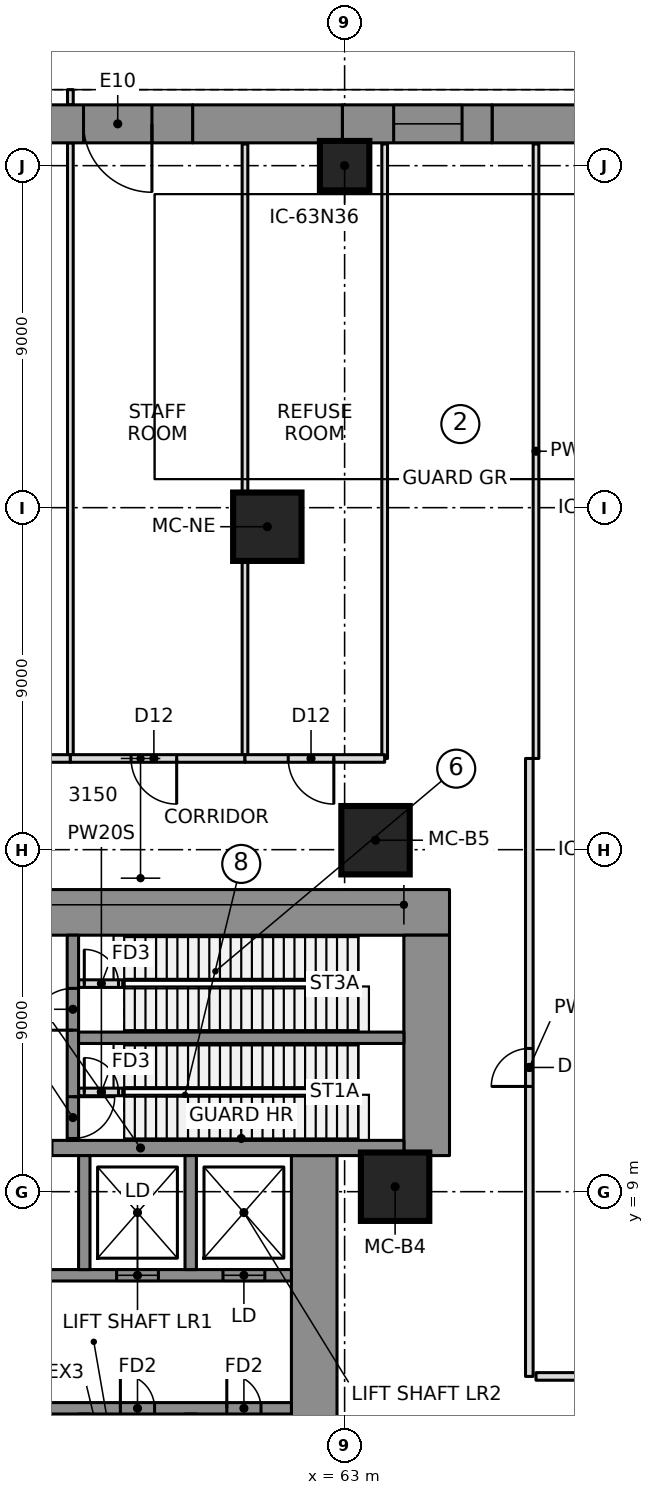
"""IFC4 building model, lengths in metres.
Left out: names, types, materials, properties, quantities, classifications, styles, units other than length and angle.
Written with IfcOpenShell. Run it as: python <this file> out.ifc"""

import sys

from ifc_helpers import new_model, si_unit, direction, frame, frame_2d, origin, origin_2d, place, context, subcontext, project, spatial, polyline, rectangle, outline, extrude, element, fill, save


model = new_model("IFC4")
c1 = context("Model", 3, precision=1e-05, world=origin(), true_north=direction((0.0, 1.0)))
c2 = subcontext(c1, "Body", "Model", "MODEL_VIEW")
j1 = project(units=[si_unit("LENGTHUNIT", "METRE"), si_unit("PLANEANGLEUNIT", "RADIAN")], contexts=[c1])
p1 = place(None, origin())
s1 = spatial("IfcSite", under=j1, at=p1, CompositionType="ELEMENT")
p2 = place(p1, origin())
s2 = spatial("IfcBuilding", under=s1, at=p2, CompositionType="ELEMENT")
p3 = place(p2, origin())
s3 = spatial("IfcBuildingStorey", under=s2, at=p3, CompositionType="ELEMENT", Elevation=0.0)
p4 = place(p3, frame((50.7, 16.35, 0.0), z_axis=(0.0, 0.0, 1.0), x_axis=(1.0, 0.0, 0.0)))
e1 = element("IfcWall", 1, at=p4, inside=s3, PredefinedType="SHEAR", context=c2, shape_type="SweptSolid", body=[
    extrude(rectangle(XDim=15.06, YDim=1.2, at=frame_2d((7.53, 0.0))), origin(), (0.0, 0.0, 1.0), 8.0),
])
p5 = place(p3, frame((65.16, 9.95, 0.0), z_axis=(0.0, 0.0, 1.0), x_axis=(0.0, 1.0, 0.0)))
e2 = element("IfcWall", 2, at=p5, inside=s3, PredefinedType="SHEAR", context=c2, shape_type="SweptSolid", body=[
    extrude(rectangle(XDim=5.8, YDim=1.2, at=frame_2d((2.9, 0.0))), origin(), (0.0, 0.0, 1.0), 8.0),
])
p6 = place(p3, frame((62.2, -9.95, 0.0), z_axis=(0.0, 0.0, 1.0), x_axis=(0.0, 1.0, 0.0)))
e3 = element("IfcWall", 3, at=p6, inside=s3, PredefinedType="SHEAR", context=c2, shape_type="SweptSolid", body=[
    extrude(rectangle(XDim=19.9, YDim=1.2, at=frame_2d((9.95, 0.0))), origin(), (0.0, 0.0, 1.0), 8.0),
])
p7 = place(p3, frame((50.7, 10.15, 0.0), z_axis=(0.0, 0.0, 1.0), x_axis=(1.0, 0.0, 0.0)))
e4 = element("IfcWall", 4, at=p7, inside=s3, PredefinedType="SHEAR", context=c2, shape_type="SweptSolid", body=[
    extrude(rectangle(XDim=13.86, YDim=0.4, at=frame_2d((6.93, 0.0))), origin(), (0.0, 0.0, 1.0), 8.0),
])
p8 = place(p7, frame((0.7, 0.0, 0.0)))
e5 = element("IfcOpeningElement", 5, at=p8, cuts=e4, PredefinedType="OPENING", context=c2, shape_type="SweptSolid", body=[
    extrude(rectangle(XDim=1.1, YDim=2.1, at=frame_2d((0.55, 1.05))), frame((0.0, 0.21, 0.0), z_axis=(0.0, -1.0, 0.0), x_axis=(1.0, 0.0, 0.0)), (0.0, 0.0, 1.0), 0.42),
])
p9 = place(p7, frame((3.5, 0.0, 0.0)))
e6 = element("IfcOpeningElement", 6, at=p9, cuts=e4, PredefinedType="OPENING", context=c2, shape_type="SweptSolid", body=[
    extrude(rectangle(XDim=1.1, YDim=2.1, at=frame_2d((0.55, 1.05))), frame((0.0, 0.21, 0.0), z_axis=(0.0, -1.0, 0.0), x_axis=(1.0, 0.0, 0.0)), (0.0, 0.0, 1.0), 0.42),
])
p10 = place(p3, frame((50.7, 3.3, 0.0), z_axis=(0.0, 0.0, 1.0), x_axis=(1.0, 0.0, 0.0)))
e7 = element("IfcWall", 7, at=p10, inside=s3, PredefinedType="SHEAR", context=c2, shape_type="SweptSolid", body=[
    extrude(rectangle(XDim=10.9, YDim=0.3, at=frame_2d((5.45, 0.0))), origin(), (0.0, 0.0, 1.0), 8.0),
])
p11 = place(p10, frame((0.8, 0.0, 0.0)))
e8 = element("IfcOpeningElement", 8, at=p11, cuts=e7, PredefinedType="OPENING", context=c2, shape_type="SweptSolid", body=[
    extrude(rectangle(XDim=0.9, YDim=2.1, at=frame_2d((0.45, 1.05))), frame((0.0, 0.16, 0.0), z_axis=(0.0, -1.0, 0.0), x_axis=(1.0, 0.0, 0.0)), (0.0, 0.0, 1.0), 0.32),
])
p12 = place(p10, frame((3.6, 0.0, 0.0)))
e9 = element("IfcOpeningElement", 9, at=p12, cuts=e7, PredefinedType="OPENING", context=c2, shape_type="SweptSolid", body=[
    extrude(rectangle(XDim=0.9, YDim=2.1, at=frame_2d((0.45, 1.05))), frame((0.0, 0.16, 0.0), z_axis=(0.0, -1.0, 0.0), x_axis=(1.0, 0.0, 0.0)), (0.0, 0.0, 1.0), 0.32),
])
p13 = place(p10, frame((6.4, 0.0, 0.0)))
e10 = element("IfcOpeningElement", 10, at=p13, cuts=e7, PredefinedType="OPENING", context=c2, shape_type="SweptSolid", body=[
    extrude(rectangle(XDim=0.9, YDim=2.1, at=frame_2d((0.45, 1.05))), frame((0.0, 0.16, 0.0), z_axis=(0.0, -1.0, 0.0), x_axis=(1.0, 0.0, 0.0)), (0.0, 0.0, 1.0), 0.32),
])
p14 = place(p10, frame((9.2, 0.0, 0.0)))
e11 = element("IfcOpeningElement", 11, at=p14, cuts=e7, PredefinedType="OPENING", context=c2, shape_type="SweptSolid", body=[
    extrude(rectangle(XDim=0.9, YDim=2.1, at=frame_2d((0.45, 1.05))), frame((0.0, 0.16, 0.0), z_axis=(0.0, -1.0, 0.0), x_axis=(1.0, 0.0, 0.0)), (0.0, 0.0, 1.0), 0.32),
])
p15 = place(p3, frame((50.7, 6.8, 0.0), z_axis=(0.0, 0.0, 1.0), x_axis=(1.0, 0.0, 0.0)))
e12 = element("IfcWall", 12, at=p15, inside=s3, PredefinedType="SHEAR", context=c2, shape_type="SweptSolid", body=[
    extrude(rectangle(XDim=10.9, YDim=0.3, at=frame_2d((5.45, 0.0))), origin(), (0.0, 0.0, 1.0), 8.0),
])
p16 = place(p15, frame((6.3, 0.0, 0.0)))
e13 = element("IfcOpeningElement", 13, at=p16, cuts=e12, PredefinedType="OPENING", context=c2, shape_type="SweptSolid", body=[
    extrude(rectangle(XDim=1.1, YDim=2.1, at=frame_2d((0.55, 1.05))), frame((0.0, 0.16, 0.0), z_axis=(0.0, -1.0, 0.0), x_axis=(1.0, 0.0, 0.0)), (0.0, 0.0, 1.0), 0.32),
])
p17 = place(p15, frame((9.1, 0.0, 0.0)))
e14 = element("IfcOpeningElement", 14, at=p17, cuts=e12, PredefinedType="OPENING", context=c2, shape_type="SweptSolid", body=[
    extrude(rectangle(XDim=1.1, YDim=2.1, at=frame_2d((0.55, 1.05))), frame((0.0, 0.16, 0.0), z_axis=(0.0, -1.0, 0.0), x_axis=(1.0, 0.0, 0.0)), (0.0, 0.0, 1.0), 0.32),
])
for number, where, z_axis, x_axis in (
    (15, (56.15, 0.15, 0.0), (0.0, 0.0, 1.0), (0.0, 1.0, 0.0)),
    (16, (56.15, 6.95, 0.0), (0.0, 0.0, 1.0), (0.0, 1.0, 0.0)),
    (17, (58.95, 0.15, 0.0), (0.0, 0.0, 1.0), (0.0, 1.0, 0.0)),
    (18, (58.95, 6.95, 0.0), (0.0, 0.0, 1.0), (0.0, 1.0, 0.0)),
):
    element("IfcWall", number, at=place(p3, frame(where, z_axis=z_axis, x_axis=x_axis)), inside=s3, PredefinedType="SHEAR", context=c2, shape_type="SweptSolid", body=[
        extrude(rectangle(XDim=3.0, YDim=0.3, at=frame_2d((1.5, 0.0))), origin(), (0.0, 0.0, 1.0), 8.0),
    ])
p18 = place(p3, frame((55.85, 10.35, 0.0), z_axis=(0.0, 0.0, 1.0), x_axis=(0.0, 1.0, 0.0)))
e19 = element("IfcWall", 19, at=p18, inside=s3, PredefinedType="SHEAR", context=c2, shape_type="SweptSolid", body=[
    extrude(rectangle(XDim=5.4, YDim=0.3, at=frame_2d((2.7, 0.0))), origin(), (0.0, 0.0, 1.0), 8.0),
])
p19 = place(p18, frame((0.05, 0.0, 0.0)))
e20 = element("IfcOpeningElement", 20, at=p19, cuts=e19, PredefinedType="OPENING", context=c2, shape_type="SweptSolid", body=[
    extrude(rectangle(XDim=1.1, YDim=2.1, at=frame_2d((0.55, 1.05))), frame((0.0, 0.16, 0.0), z_axis=(0.0, -1.0, 0.0), x_axis=(1.0, 0.0, 0.0)), (0.0, 0.0, 1.0), 0.32),
])
p20 = place(p18, frame((2.9, 0.0, 0.0)))
e21 = element("IfcOpeningElement", 21, at=p20, cuts=e19, PredefinedType="OPENING", context=c2, shape_type="SweptSolid", body=[
    extrude(rectangle(XDim=1.1, YDim=2.1, at=frame_2d((0.55, 1.05))), frame((0.0, 0.16, 0.0), z_axis=(0.0, -1.0, 0.0), x_axis=(1.0, 0.0, 0.0)), (0.0, 0.0, 1.0), 0.32),
])
p21 = place(p3, frame((56.0, 13.05, 0.0), z_axis=(0.0, 0.0, 1.0), x_axis=(1.0, 0.0, 0.0)))
e22 = element("IfcWall", 22, at=p21, inside=s3, PredefinedType="SHEAR", context=c2, shape_type="SweptSolid", body=[
    extrude(rectangle(XDim=8.56, YDim=0.3, at=frame_2d((4.28, 0.0))), origin(), (0.0, 0.0, 1.0), 8.0),
])
for number, where, z_axis, x_axis in (
    (23, (64.328, 9.131, 0.0), (0.0, 0.0, 1.0), (1.0, 0.0, 0.0)),
    (24, (63.813, 18.249, 0.0), (0.0, 0.0, 1.0), (1.0, 0.0, 0.0)),
    (25, (60.966, 26.499, 0.0), (0.0, 0.0, 1.0), (1.0, 0.0, 0.0)),
):
    element("IfcColumn", number, at=place(p3, frame(where, z_axis=z_axis, x_axis=x_axis)), inside=s3, PredefinedType="COLUMN", context=c2, shape_type="SweptSolid", body=[
        extrude(rectangle(XDim=1.8, YDim=1.8, at=origin_2d()), origin(), (0.0, 0.0, 1.0), 8.0),
    ])
p22 = place(p3, frame((63.0, 36.0, 0.0), z_axis=(0.0, 0.0, 1.0), x_axis=(1.0, 0.0, 0.0)))
e26 = element("IfcColumn", 26, at=p22, inside=s3, PredefinedType="COLUMN", context=c2, shape_type="SweptSolid", body=[
    extrude(rectangle(XDim=1.3, YDim=1.3, at=origin_2d()), origin(), (0.0, 0.0, 1.0), 8.0),
])
p23 = place(p3, frame((70.821, 37.1, 0.0), z_axis=(0.0, 0.0, 1.0), x_axis=(-1.0, 0.0, 0.0)))
e27 = element("IfcWall", 27, at=p23, inside=s3, PredefinedType="NOTDEFINED", context=c2, shape_type="SweptSolid", body=[
    extrude(outline(polyline([(-0.1, -0.5), (3.94, -0.5), (3.94, 0.5), (0.1, 0.5), (-0.1, -0.5)])), origin(), (0.0, 0.0, 1.0), 7.7),
])
p24 = place(p3, frame((66.881, 37.1, 0.0), z_axis=(0.0, 0.0, 1.0), x_axis=(-1.0, 0.0, 0.0)))
e28 = element("IfcWall", 28, at=p24, inside=s3, PredefinedType="NOTDEFINED", context=c2, shape_type="SweptSolid", body=[
    extrude(outline(polyline([(0.0, -0.5), (3.94, -0.5), (3.94, 0.5), (0.0, 0.5), (0.0, -0.5)])), origin(), (0.0, 0.0, 1.0), 7.7),
])
p25 = place(p24, frame((0.79, 0.0, 0.9)))
e29 = element("IfcOpeningElement", 29, at=p25, cuts=e28, PredefinedType="OPENING", context=c2, shape_type="SweptSolid", body=[
    extrude(rectangle(XDim=1.8, YDim=2.4, at=frame_2d((0.9, 1.2))), frame((0.0, 0.51, 0.0), z_axis=(0.0, -1.0, 0.0), x_axis=(1.0, 0.0, 0.0)), (0.0, 0.0, 1.0), 1.02),
])
p26 = place(p3, frame((62.94, 37.1, 0.0), z_axis=(0.0, 0.0, 1.0), x_axis=(-1.0, 0.0, 0.0)))
e30 = element("IfcWall", 30, at=p26, inside=s3, PredefinedType="NOTDEFINED", context=c2, shape_type="SweptSolid", body=[
    extrude(outline(polyline([(0.0, -0.5), (3.94, -0.5), (3.94, 0.5), (0.0, 0.5), (0.0, -0.5)])), origin(), (0.0, 0.0, 1.0), 7.7),
])
p27 = place(p3, frame((59.0, 37.1, 0.0), z_axis=(0.0, 0.0, 1.0), x_axis=(-1.0, 0.0, 0.0)))
e31 = element("IfcWall", 31, at=p27, inside=s3, PredefinedType="NOTDEFINED", context=c2, shape_type="SweptSolid", body=[
    extrude(outline(polyline([(0.0, -0.5), (3.94, -0.5), (3.94, 0.5), (0.0, 0.5), (0.0, -0.5)])), origin(), (0.0, 0.0, 1.0), 7.7),
])
p28 = place(p27, frame((1.07, 0.0, 0.0)))
e32 = element("IfcOpeningElement", 32, at=p28, cuts=e31, PredefinedType="OPENING", context=c2, shape_type="SweptSolid", body=[
    extrude(rectangle(XDim=1.8, YDim=2.4, at=frame_2d((0.9, 1.2))), frame((0.0, 0.51, 0.0), z_axis=(0.0, -1.0, 0.0), x_axis=(1.0, 0.0, 0.0)), (0.0, 0.0, 1.0), 1.02),
])
p29 = place(p3, frame((55.784, 20.4, 0.0), z_axis=(0.0, 0.0, 1.0), x_axis=(0.0, 1.0, 0.0)))
e33 = element("IfcWall", 33, at=p29, inside=s3, PredefinedType="PARTITIONING", context=c2, shape_type="SweptSolid", body=[
    extrude(rectangle(XDim=16.2, YDim=0.15, at=frame_2d((8.1, 0.0))), origin(), (0.0, 0.0, 1.0), 7.65),
])
p30 = place(p3, frame((55.784, 37.6, 0.0), z_axis=(0.0, 0.0, 1.0), x_axis=(0.0, 1.0, 0.0)))
e34 = element("IfcWall", 34, at=p30, inside=s3, PredefinedType="PARTITIONING", context=c2, shape_type="SweptSolid", body=[
    extrude(rectangle(XDim=0.4, YDim=0.15, at=frame_2d((0.2, 0.0))), origin(), (0.0, 0.0, 1.0), 7.65),
])
for number, where, z_axis, x_axis in (
    (35, (60.378, 20.4, 0.0), (0.0, 0.0, 1.0), (0.0, 1.0, 0.0)),
    (36, (64.054, 20.4, 0.0), (0.0, 0.0, 1.0), (0.0, 1.0, 0.0)),
):
    element("IfcWall", number, at=place(p3, frame(where, z_axis=z_axis, x_axis=x_axis)), inside=s3, PredefinedType="PARTITIONING", context=c2, shape_type="SweptSolid", body=[
        extrude(rectangle(XDim=16.17, YDim=0.15, at=frame_2d((8.085, 0.0))), origin(), (0.0, 0.0, 1.0), 7.65),
    ])
p31 = place(p3, frame((68.036, 4.139, 0.0), z_axis=(0.0, 0.0, 1.0), x_axis=(1.0, 0.0, 0.0)))
e37 = element("IfcWall", 37, at=p31, inside=s3, PredefinedType="PARTITIONING", context=c2, shape_type="SweptSolid", body=[
    extrude(rectangle(XDim=4.595, YDim=0.2, at=frame_2d((2.297, 0.0))), origin(), (0.0, 0.0, 1.0), 7.65),
])
p32 = place(p31, frame((1.797, 0.0, 0.0)))
e38 = element("IfcOpeningElement", 38, at=p32, cuts=e37, PredefinedType="OPENING", context=c2, shape_type="SweptSolid", body=[
    extrude(rectangle(XDim=1.2, YDim=2.1, at=frame_2d((0.6, 1.05))), frame((0.0, 0.11, 0.0), z_axis=(0.0, -1.0, 0.0), x_axis=(1.0, 0.0, 0.0)), (0.0, 0.0, 1.0), 0.22),
])
p33 = place(p3, frame((55.784, 20.4, 0.0), z_axis=(0.0, 0.0, 1.0), x_axis=(-1.0, 0.0, 0.0)))
e39 = element("IfcWall", 39, at=p33, inside=s3, PredefinedType="PARTITIONING", context=c2, shape_type="SweptSolid", body=[
    extrude(rectangle(XDim=4.594, YDim=0.2, at=frame_2d((2.297, 0.0))), origin(), (0.0, 0.0, 1.0), 7.65),
])
p34 = place(p33, frame((1.797, 0.0, 0.0)))
e40 = element("IfcOpeningElement", 40, at=p34, cuts=e39, PredefinedType="OPENING", context=c2, shape_type="SweptSolid", body=[
    extrude(rectangle(XDim=1.2, YDim=2.1, at=frame_2d((0.6, 1.05))), frame((0.0, 0.11, 0.0), z_axis=(0.0, -1.0, 0.0), x_axis=(1.0, 0.0, 0.0)), (0.0, 0.0, 1.0), 0.22),
])
p35 = place(p3, frame((60.378, 20.4, 0.0), z_axis=(0.0, 0.0, 1.0), x_axis=(-1.0, 0.0, 0.0)))
e41 = element("IfcWall", 41, at=p35, inside=s3, PredefinedType="PARTITIONING", context=c2, shape_type="SweptSolid", body=[
    extrude(rectangle(XDim=4.595, YDim=0.2, at=frame_2d((2.297, 0.0))), origin(), (0.0, 0.0, 1.0), 7.65),
])
p36 = place(p35, frame((1.797, 0.0, 0.0)))
e42 = element("IfcOpeningElement", 42, at=p36, cuts=e41, PredefinedType="OPENING", context=c2, shape_type="SweptSolid", body=[
    extrude(rectangle(XDim=1.2, YDim=2.1, at=frame_2d((0.6, 1.05))), frame((0.0, 0.11, 0.0), z_axis=(0.0, -1.0, 0.0), x_axis=(1.0, 0.0, 0.0)), (0.0, 0.0, 1.0), 0.22),
])
p37 = place(p3, frame((64.054, 20.4, 0.0), z_axis=(0.0, 0.0, 1.0), x_axis=(-1.0, 0.0, 0.0)))
e43 = element("IfcWall", 43, at=p37, inside=s3, PredefinedType="PARTITIONING", context=c2, shape_type="SweptSolid", body=[
    extrude(rectangle(XDim=3.676, YDim=0.2, at=frame_2d((1.838, 0.0))), origin(), (0.0, 0.0, 1.0), 7.65),
])
p38 = place(p37, frame((1.338, 0.0, 0.0)))
e44 = element("IfcOpeningElement", 44, at=p38, cuts=e43, PredefinedType="OPENING", context=c2, shape_type="SweptSolid", body=[
    extrude(rectangle(XDim=1.2, YDim=2.1, at=frame_2d((0.6, 1.05))), frame((0.0, 0.11, 0.0), z_axis=(0.0, -1.0, 0.0), x_axis=(1.0, 0.0, 0.0)), (0.0, 0.0, 1.0), 0.22),
])
p39 = place(p3, frame((67.86, 4.139, 0.0), z_axis=(0.0, 0.0, 1.0), x_axis=(0.0, 1.0, 0.0)))
e45 = element("IfcWall", 45, at=p39, inside=s3, PredefinedType="PARTITIONING", context=c2, shape_type="SweptSolid", body=[
    extrude(rectangle(XDim=16.261, YDim=0.2, at=frame_2d((8.131, 0.0))), origin(), (0.0, 0.0, 1.0), 7.65),
])
p40 = place(p39, frame((7.631, 0.0, 0.0)))
e46 = element("IfcOpeningElement", 46, at=p40, cuts=e45, PredefinedType="OPENING", context=c2, shape_type="SweptSolid", body=[
    extrude(rectangle(XDim=1.0, YDim=2.1, at=frame_2d((0.5, 1.05))), frame((0.0, 0.11, 0.0), z_axis=(0.0, -1.0, 0.0), x_axis=(1.0, 0.0, 0.0)), (0.0, 0.0, 1.0), 0.22),
])
p41 = place(p3, frame((68.036, 20.4, 0.0), z_axis=(0.0, 0.0, 1.0), x_axis=(0.0, 1.0, 0.0)))
e47 = element("IfcWall", 47, at=p41, inside=s3, PredefinedType="PARTITIONING", context=c2, shape_type="SweptSolid", body=[
    extrude(rectangle(XDim=16.17, YDim=0.15, at=frame_2d((8.085, 0.0))), origin(), (0.0, 0.0, 1.0), 7.65),
])
p42 = place(p3, frame((56.0, 11.625, 0.0), z_axis=(0.0, 0.0, 1.0), x_axis=(1.0, 0.0, 0.0)))
e48 = element("IfcWall", 48, at=p42, inside=s3, PredefinedType="PARTITIONING", context=c2, shape_type="SweptSolid", body=[
    extrude(rectangle(XDim=1.2, YDim=0.2, at=frame_2d((0.6, 0.0))), origin(), (0.0, 0.0, 1.0), 7.65),
])
p43 = place(p42, frame((0.15, 0.0, 0.0)))
e49 = element("IfcOpeningElement", 49, at=p43, cuts=e48, PredefinedType="OPENING", context=c2, shape_type="SweptSolid", body=[
    extrude(rectangle(XDim=0.9, YDim=2.1, at=frame_2d((0.45, 1.05))), frame((0.0, 0.11, 0.0), z_axis=(0.0, -1.0, 0.0), x_axis=(1.0, 0.0, 0.0)), (0.0, 0.0, 1.0), 0.22),
])
p44 = place(p3, frame((56.0, 14.475, 0.0), z_axis=(0.0, 0.0, 1.0), x_axis=(1.0, 0.0, 0.0)))
e50 = element("IfcWall", 50, at=p44, inside=s3, PredefinedType="PARTITIONING", context=c2, shape_type="SweptSolid", body=[
    extrude(rectangle(XDim=1.2, YDim=0.2, at=frame_2d((0.6, 0.0))), origin(), (0.0, 0.0, 1.0), 7.65),
])
p45 = place(p44, frame((0.15, 0.0, 0.0)))
e51 = element("IfcOpeningElement", 51, at=p45, cuts=e50, PredefinedType="OPENING", context=c2, shape_type="SweptSolid", body=[
    extrude(rectangle(XDim=0.9, YDim=2.1, at=frame_2d((0.45, 1.05))), frame((0.0, 0.11, 0.0), z_axis=(0.0, -1.0, 0.0), x_axis=(1.0, 0.0, 0.0)), (0.0, 0.0, 1.0), 0.22),
])
p46 = place(p25, origin())
e52 = element("IfcWindow", 52, at=p46, inside=s3, PartitioningType="SINGLE_PANEL", PredefinedType="WINDOW", context=c2, shape_type="SweptSolid", body=[
    extrude(rectangle(XDim=1.8, YDim=2.4, at=frame_2d((0.9, 1.2))), frame((0.0, 0.5, 0.0), z_axis=(0.0, -1.0, 0.0), x_axis=(1.0, 0.0, 0.0)), (0.0, 0.0, 1.0), 0.06),
])
fill(e29, e52)
p47 = place(p28, origin())
e53 = element("IfcDoor", 53, at=p47, inside=s3, OperationType="DOUBLE_DOOR_SINGLE_SWING", PredefinedType="DOOR", context=c2, shape_type="SweptSolid", body=[
    extrude(rectangle(XDim=1.8, YDim=2.4, at=frame_2d((0.9, 1.2))), frame((0.0, 0.495, 0.0), z_axis=(0.0, -1.0, 0.0), x_axis=(1.0, 0.0, 0.0)), (0.0, 0.0, 1.0), 0.05),
])
fill(e32, e53)
p48 = place(p36, origin())
e54 = element("IfcDoor", 54, at=p48, inside=s3, OperationType="SINGLE_SWING_RIGHT", PredefinedType="DOOR", context=c2, shape_type="SweptSolid", body=[
    extrude(rectangle(XDim=1.2, YDim=2.1, at=frame_2d((0.6, 1.05))), frame((0.0, 0.025, 0.0), z_axis=(0.0, -1.0, 0.0), x_axis=(1.0, 0.0, 0.0)), (0.0, 0.0, 1.0), 0.05),
])
fill(e42, e54)
p49 = place(p38, origin())
e55 = element("IfcDoor", 55, at=p49, inside=s3, OperationType="SINGLE_SWING_RIGHT", PredefinedType="DOOR", context=c2, shape_type="SweptSolid", body=[
    extrude(rectangle(XDim=1.2, YDim=2.1, at=frame_2d((0.6, 1.05))), frame((0.0, 0.025, 0.0), z_axis=(0.0, -1.0, 0.0), x_axis=(1.0, 0.0, 0.0)), (0.0, 0.0, 1.0), 0.05),
])
fill(e44, e55)
p50 = place(p40, origin())
e56 = element("IfcDoor", 56, at=p50, inside=s3, OperationType="SINGLE_SWING_LEFT", PredefinedType="DOOR", context=c2, shape_type="SweptSolid", body=[
    extrude(rectangle(XDim=1.0, YDim=2.1, at=frame_2d((0.5, 1.05))), frame((0.0, 0.025, 0.0), z_axis=(0.0, -1.0, 0.0), x_axis=(1.0, 0.0, 0.0)), (0.0, 0.0, 1.0), 0.05),
])
fill(e46, e56)
p51 = place(p43, origin())
e57 = element("IfcDoor", 57, at=p51, inside=s3, OperationType="SINGLE_SWING_LEFT", PredefinedType="DOOR", context=c2, shape_type="SweptSolid", body=[
    extrude(rectangle(XDim=0.9, YDim=2.1, at=frame_2d((0.45, 1.05))), frame((0.0, 0.025, 0.0), z_axis=(0.0, -1.0, 0.0), x_axis=(1.0, 0.0, 0.0)), (0.0, 0.0, 1.0), 0.05),
])
fill(e49, e57)
p52 = place(p45, origin())
e58 = element("IfcDoor", 58, at=p52, inside=s3, OperationType="SINGLE_SWING_LEFT", PredefinedType="DOOR", context=c2, shape_type="SweptSolid", body=[
    extrude(rectangle(XDim=0.9, YDim=2.1, at=frame_2d((0.45, 1.05))), frame((0.0, 0.025, 0.0), z_axis=(0.0, -1.0, 0.0), x_axis=(1.0, 0.0, 0.0)), (0.0, 0.0, 1.0), 0.05),
])
fill(e51, e58)
p53 = place(p16, origin())
e59 = element("IfcDoor", 59, at=p53, inside=s3, OperationType="DOUBLE_DOOR_SLIDING", PredefinedType="DOOR", context=c2, shape_type="SweptSolid", body=[
    extrude(rectangle(XDim=1.1, YDim=2.1, at=frame_2d((0.55, 1.05))), frame((0.0, 0.025, 0.0), z_axis=(0.0, -1.0, 0.0), x_axis=(1.0, 0.0, 0.0)), (0.0, 0.0, 1.0), 0.05),
])
fill(e13, e59)
p54 = place(p17, origin())
e60 = element("IfcDoor", 60, at=p54, inside=s3, OperationType="DOUBLE_DOOR_SLIDING", PredefinedType="DOOR", context=c2, shape_type="SweptSolid", body=[
    extrude(rectangle(XDim=1.1, YDim=2.1, at=frame_2d((0.55, 1.05))), frame((0.0, 0.025, 0.0), z_axis=(0.0, -1.0, 0.0), x_axis=(1.0, 0.0, 0.0)), (0.0, 0.0, 1.0), 0.05),
])
fill(e14, e60)
p55 = place(p19, origin())
e61 = element("IfcDoor", 61, at=p55, inside=s3, OperationType="SINGLE_SWING_LEFT", PredefinedType="DOOR", context=c2, shape_type="SweptSolid", body=[
    extrude(rectangle(XDim=1.1, YDim=2.1, at=frame_2d((0.55, 1.05))), frame((0.0, 0.025, 0.0), z_axis=(0.0, -1.0, 0.0), x_axis=(1.0, 0.0, 0.0)), (0.0, 0.0, 1.0), 0.05),
])
fill(e20, e61)
p56 = place(p20, origin())
e62 = element("IfcDoor", 62, at=p56, inside=s3, OperationType="SINGLE_SWING_RIGHT", PredefinedType="DOOR", context=c2, shape_type="SweptSolid", body=[
    extrude(rectangle(XDim=1.1, YDim=2.1, at=frame_2d((0.55, 1.05))), frame((0.0, 0.025, 0.0), z_axis=(0.0, -1.0, 0.0), x_axis=(1.0, 0.0, 0.0)), (0.0, 0.0, 1.0), 0.05),
])
fill(e21, e62)
p57 = place(p13, origin())
e63 = element("IfcDoor", 63, at=p57, inside=s3, OperationType="SINGLE_SWING_LEFT", PredefinedType="DOOR", context=c2, shape_type="SweptSolid", body=[
    extrude(rectangle(XDim=0.9, YDim=2.1, at=frame_2d((0.45, 1.05))), frame((0.0, 0.025, 0.0), z_axis=(0.0, -1.0, 0.0), x_axis=(1.0, 0.0, 0.0)), (0.0, 0.0, 1.0), 0.05),
])
fill(e10, e63)
p58 = place(p14, origin())
e64 = element("IfcDoor", 64, at=p58, inside=s3, OperationType="SINGLE_SWING_LEFT", PredefinedType="DOOR", context=c2, shape_type="SweptSolid", body=[
    extrude(rectangle(XDim=0.9, YDim=2.1, at=frame_2d((0.45, 1.05))), frame((0.0, 0.025, 0.0), z_axis=(0.0, -1.0, 0.0), x_axis=(1.0, 0.0, 0.0)), (0.0, 0.0, 1.0), 0.05),
])
fill(e11, e64)
save(model, sys.argv[1])
